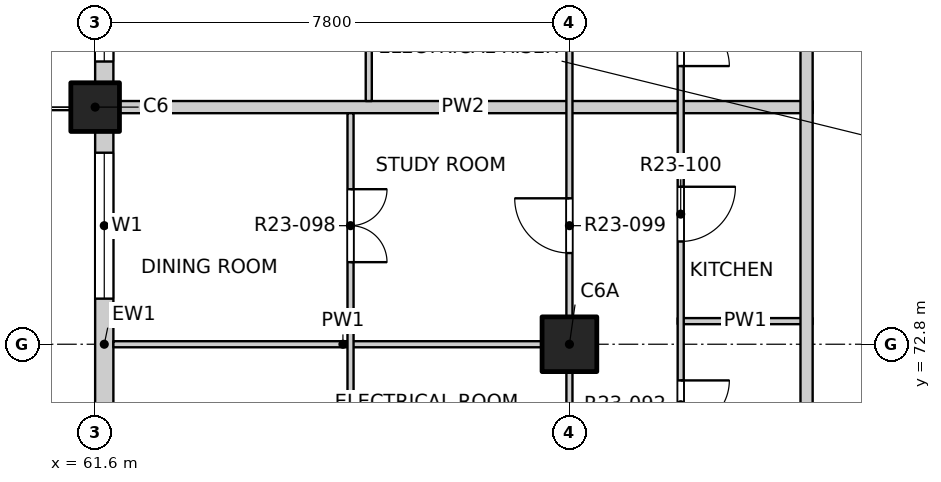
"""IFC4 building model, lengths in metres.
Left out: names, types, materials, properties, quantities, classifications, styles, units other than length and angle.
Written with IfcOpenShell. Run it as: python <this file> out.ifc"""

import sys

from ifc_helpers import new_model, si_unit, direction, frame, frame_2d, origin, origin_2d, place, context, subcontext, project, spatial, rectangle, extrude, element, fill, save


model = new_model("IFC4")
c1 = context("Model", 3, precision=1e-05, world=origin(), true_north=direction((0.0, 1.0)))
c2 = subcontext(c1, "Body", "Model", "MODEL_VIEW")
j1 = project(units=[si_unit("LENGTHUNIT", "METRE"), si_unit("PLANEANGLEUNIT", "RADIAN")], contexts=[c1])
p1 = place(None, origin())
s1 = spatial("IfcSite", under=j1, at=p1, CompositionType="ELEMENT")
p2 = place(p1, origin())
s2 = spatial("IfcBuilding", under=s1, at=p2, CompositionType="ELEMENT")
p3 = place(p2, frame((0.0, 0.0, 238.1)))
s3 = spatial("IfcBuildingStorey", under=s2, at=p3, CompositionType="ELEMENT", Elevation=238.1)
p4 = place(p3, frame((61.6, 76.7, -0.25), z_axis=(0.0, 0.0, 1.0), x_axis=(1.0, 0.0, 0.0)))
e1 = element("IfcColumn", 1, at=p4, inside=s3, PredefinedType="COLUMN", context=c2, shape_type="SweptSolid", body=[
    extrude(rectangle(XDim=0.8, YDim=0.8, at=origin_2d()), origin(), (0.0, 0.0, 1.0), 3.35),
])
p5 = place(p3, frame((69.4, 72.8, -0.25), z_axis=(0.0, 0.0, 1.0), x_axis=(1.0, 0.0, 0.0)))
e2 = element("IfcColumn", 2, at=p5, inside=s3, PredefinedType="COLUMN", context=c2, shape_type="SweptSolid", body=[
    extrude(rectangle(XDim=0.9, YDim=0.9, at=origin_2d()), origin(), (0.0, 0.0, 1.0), 3.35),
])
p6 = place(p3, frame((61.75, 69.3, 0.0), z_axis=(0.0, 0.0, 1.0), x_axis=(0.0, 1.0, 0.0)))
e3 = element("IfcWall", 3, at=p6, inside=s3, PredefinedType="SOLIDWALL", context=c2, shape_type="SweptSolid", body=[
    extrude(rectangle(XDim=7.0, YDim=0.3, at=frame_2d((3.5, 0.0))), origin(), (0.0, 0.0, 1.0), 3.1),
])
p7 = place(p6, frame((0.65, 0.0, 0.0)))
e4 = element("IfcOpeningElement", 4, at=p7, cuts=e3, PredefinedType="OPENING", context=c2, shape_type="SweptSolid", body=[
    extrude(rectangle(XDim=1.8, YDim=2.4, at=frame_2d((0.9, 1.2))), frame((0.0, 0.16, 0.0), z_axis=(0.0, -1.0, 0.0), x_axis=(1.0, 0.0, 0.0)), (0.0, 0.0, 1.0), 0.32),
])
p8 = place(p6, frame((4.25, 0.0, 0.9)))
e5 = element("IfcOpeningElement", 5, at=p8, cuts=e3, PredefinedType="OPENING", context=c2, shape_type="SweptSolid", body=[
    extrude(rectangle(XDim=2.4, YDim=1.8, at=frame_2d((1.2, 0.9))), frame((0.0, 0.16, 0.0), z_axis=(0.0, -1.0, 0.0), x_axis=(1.0, 0.0, 0.0)), (0.0, 0.0, 1.0), 0.32),
])
p9 = place(p3, frame((61.75, 77.1, 0.0), z_axis=(0.0, 0.0, 1.0), x_axis=(0.0, 1.0, 0.0)))
e6 = element("IfcWall", 6, at=p9, inside=s3, PredefinedType="SOLIDWALL", context=c2, shape_type="SweptSolid", body=[
    extrude(rectangle(XDim=7.4, YDim=0.3, at=frame_2d((3.7, 0.0))), origin(), (0.0, 0.0, 1.0), 3.1),
])
p10 = place(p9, frame((0.35, 0.0, 0.9)))
e7 = element("IfcOpeningElement", 7, at=p10, cuts=e6, PredefinedType="OPENING", context=c2, shape_type="SweptSolid", body=[
    extrude(rectangle(XDim=2.4, YDim=1.8, at=frame_2d((1.2, 0.9))), frame((0.0, 0.16, 0.0), z_axis=(0.0, -1.0, 0.0), x_axis=(1.0, 0.0, 0.0)), (0.0, 0.0, 1.0), 0.32),
])
p11 = place(p9, frame((4.25, 0.0, 0.9)))
e8 = element("IfcOpeningElement", 8, at=p11, cuts=e6, PredefinedType="OPENING", context=c2, shape_type="SweptSolid", body=[
    extrude(rectangle(XDim=2.4, YDim=1.8, at=frame_2d((1.2, 0.9))), frame((0.0, 0.16, 0.0), z_axis=(0.0, -1.0, 0.0), x_axis=(1.0, 0.0, 0.0)), (0.0, 0.0, 1.0), 0.32),
])
p12 = place(p3, frame((61.9, 72.8, 0.0), z_axis=(0.0, 0.0, 1.0), x_axis=(1.0, 0.0, 0.0)))
e9 = element("IfcWall", 9, at=p12, inside=s3, PredefinedType="PARTITIONING", context=c2, shape_type="SweptSolid", body=[
    extrude(rectangle(XDim=7.55, YDim=0.1, at=frame_2d((3.775, 0.0))), origin(), (0.0, 0.0, 1.0), 3.1),
])
p13 = place(p3, frame((71.18, 73.18, 0.0), z_axis=(0.0, 0.0, 1.0), x_axis=(1.0, 0.0, 0.0)))
e10 = element("IfcWall", 10, at=p13, inside=s3, PredefinedType="PARTITIONING", context=c2, shape_type="SweptSolid", body=[
    extrude(rectangle(XDim=2.22, YDim=0.1, at=frame_2d((1.11, 0.0))), origin(), (0.0, 0.0, 1.0), 3.1),
])
p14 = place(p3, frame((61.9, 76.7, 0.0), z_axis=(0.0, 0.0, 1.0), x_axis=(1.0, 0.0, 0.0)))
e11 = element("IfcWall", 11, at=p14, inside=s3, PredefinedType="PARTITIONING", context=c2, shape_type="SweptSolid", body=[
    extrude(rectangle(XDim=11.5, YDim=0.2, at=frame_2d((5.75, 0.0))), origin(), (0.0, 0.0, 1.0), 3.1),
])
p15 = place(p3, frame((65.8, 61.2, 0.0), z_axis=(0.0, 0.0, 1.0), x_axis=(0.0, 1.0, 0.0)))
e12 = element("IfcWall", 12, at=p15, inside=s3, PredefinedType="PARTITIONING", context=c2, shape_type="SweptSolid", body=[
    extrude(rectangle(XDim=15.4, YDim=0.1, at=frame_2d((7.7, 0.0))), origin(), (0.0, 0.0, 1.0), 3.1),
])
p16 = place(p15, frame((0.425, 0.0, 0.0)))
e13 = element("IfcOpeningElement", 13, at=p16, cuts=e12, PredefinedType="OPENING", context=c2, shape_type="SweptSolid", body=[
    extrude(rectangle(XDim=0.9, YDim=2.1, at=frame_2d((0.45, 1.05))), frame((0.0, 0.06, 0.0), z_axis=(0.0, -1.0, 0.0), x_axis=(1.0, 0.0, 0.0)), (0.0, 0.0, 1.0), 0.12),
])
p17 = place(p15, frame((2.375, 0.0, 0.0)))
e14 = element("IfcOpeningElement", 14, at=p17, cuts=e12, PredefinedType="OPENING", context=c2, shape_type="SweptSolid", body=[
    extrude(rectangle(XDim=0.9, YDim=2.1, at=frame_2d((0.45, 1.05))), frame((0.0, 0.06, 0.0), z_axis=(0.0, -1.0, 0.0), x_axis=(1.0, 0.0, 0.0)), (0.0, 0.0, 1.0), 0.12),
])
p18 = place(p15, frame((4.325, 0.0, 0.0)))
e15 = element("IfcOpeningElement", 15, at=p18, cuts=e12, PredefinedType="OPENING", context=c2, shape_type="SweptSolid", body=[
    extrude(rectangle(XDim=0.9, YDim=2.1, at=frame_2d((0.45, 1.05))), frame((0.0, 0.06, 0.0), z_axis=(0.0, -1.0, 0.0), x_axis=(1.0, 0.0, 0.0)), (0.0, 0.0, 1.0), 0.12),
])
p19 = place(p15, frame((6.275, 0.0, 0.0)))
e16 = element("IfcOpeningElement", 16, at=p19, cuts=e12, PredefinedType="OPENING", context=c2, shape_type="SweptSolid", body=[
    extrude(rectangle(XDim=0.9, YDim=2.1, at=frame_2d((0.45, 1.05))), frame((0.0, 0.06, 0.0), z_axis=(0.0, -1.0, 0.0), x_axis=(1.0, 0.0, 0.0)), (0.0, 0.0, 1.0), 0.12),
])
p20 = place(p15, frame((9.05, 0.0, 0.0)))
e17 = element("IfcOpeningElement", 17, at=p20, cuts=e12, PredefinedType="OPENING", context=c2, shape_type="SweptSolid", body=[
    extrude(rectangle(XDim=1.2, YDim=2.1, at=frame_2d((0.6, 1.05))), frame((0.0, 0.06, 0.0), z_axis=(0.0, -1.0, 0.0), x_axis=(1.0, 0.0, 0.0)), (0.0, 0.0, 1.0), 0.12),
])
p21 = place(p15, frame((12.95, 0.0, 0.0)))
e18 = element("IfcOpeningElement", 18, at=p21, cuts=e12, PredefinedType="OPENING", context=c2, shape_type="SweptSolid", body=[
    extrude(rectangle(XDim=1.2, YDim=2.1, at=frame_2d((0.6, 1.05))), frame((0.0, 0.06, 0.0), z_axis=(0.0, -1.0, 0.0), x_axis=(1.0, 0.0, 0.0)), (0.0, 0.0, 1.0), 0.12),
])
p22 = place(p3, frame((66.1, 76.8, 0.0), z_axis=(0.0, 0.0, 1.0), x_axis=(0.0, 1.0, 0.0)))
e19 = element("IfcWall", 19, at=p22, inside=s3, PredefinedType="PARTITIONING", context=c2, shape_type="SweptSolid", body=[
    extrude(rectangle(XDim=11.3, YDim=0.1, at=frame_2d((5.65, 0.0))), origin(), (0.0, 0.0, 1.0), 3.1),
])
p23 = place(p22, frame((1.25, 0.0, 0.0)))
e20 = element("IfcOpeningElement", 20, at=p23, cuts=e19, PredefinedType="OPENING", context=c2, shape_type="SweptSolid", body=[
    extrude(rectangle(XDim=1.2, YDim=2.1, at=frame_2d((0.6, 1.05))), frame((0.0, 0.06, 0.0), z_axis=(0.0, -1.0, 0.0), x_axis=(1.0, 0.0, 0.0)), (0.0, 0.0, 1.0), 0.12),
])
p24 = place(p22, frame((5.15, 0.0, 0.0)))
e21 = element("IfcOpeningElement", 21, at=p24, cuts=e19, PredefinedType="OPENING", context=c2, shape_type="SweptSolid", body=[
    extrude(rectangle(XDim=1.2, YDim=2.1, at=frame_2d((0.6, 1.05))), frame((0.0, 0.06, 0.0), z_axis=(0.0, -1.0, 0.0), x_axis=(1.0, 0.0, 0.0)), (0.0, 0.0, 1.0), 0.12),
])
p25 = place(p22, frame((9.05, 0.0, 0.0)))
e22 = element("IfcOpeningElement", 22, at=p25, cuts=e19, PredefinedType="OPENING", context=c2, shape_type="SweptSolid", body=[
    extrude(rectangle(XDim=1.2, YDim=2.1, at=frame_2d((0.6, 1.05))), frame((0.0, 0.06, 0.0), z_axis=(0.0, -1.0, 0.0), x_axis=(1.0, 0.0, 0.0)), (0.0, 0.0, 1.0), 0.12),
])
p26 = place(p3, frame((69.4, 41.9, 0.0), z_axis=(0.0, 0.0, 1.0), x_axis=(0.0, 1.0, 0.0)))
e23 = element("IfcWall", 23, at=p26, inside=s3, PredefinedType="PARTITIONING", context=c2, shape_type="SweptSolid", body=[
    extrude(rectangle(XDim=46.2, YDim=0.1, at=frame_2d((23.1, 0.0))), origin(), (0.0, 0.0, 1.0), 3.1),
])
p27 = place(p26, frame((1.2, 0.0, 0.0)))
e24 = element("IfcOpeningElement", 24, at=p27, cuts=e23, PredefinedType="OPENING", context=c2, shape_type="SweptSolid", body=[
    extrude(rectangle(XDim=0.9, YDim=2.1, at=frame_2d((0.45, 1.05))), frame((0.0, 0.06, 0.0), z_axis=(0.0, -1.0, 0.0), x_axis=(1.0, 0.0, 0.0)), (0.0, 0.0, 1.0), 0.12),
])
p28 = place(p26, frame((6.025, 0.0, 0.0)))
e25 = element("IfcOpeningElement", 25, at=p28, cuts=e23, PredefinedType="OPENING", context=c2, shape_type="SweptSolid", body=[
    extrude(rectangle(XDim=0.9, YDim=2.1, at=frame_2d((0.45, 1.05))), frame((0.0, 0.06, 0.0), z_axis=(0.0, -1.0, 0.0), x_axis=(1.0, 0.0, 0.0)), (0.0, 0.0, 1.0), 0.12),
])
p29 = place(p26, frame((9.975, 0.0, 0.0)))
e26 = element("IfcOpeningElement", 26, at=p29, cuts=e23, PredefinedType="OPENING", context=c2, shape_type="SweptSolid", body=[
    extrude(rectangle(XDim=0.9, YDim=2.1, at=frame_2d((0.45, 1.05))), frame((0.0, 0.06, 0.0), z_axis=(0.0, -1.0, 0.0), x_axis=(1.0, 0.0, 0.0)), (0.0, 0.0, 1.0), 0.12),
])
p30 = place(p26, frame((12.9, 0.0, 0.0)))
e27 = element("IfcOpeningElement", 27, at=p30, cuts=e23, PredefinedType="OPENING", context=c2, shape_type="SweptSolid", body=[
    extrude(rectangle(XDim=0.9, YDim=2.1, at=frame_2d((0.45, 1.05))), frame((0.0, 0.06, 0.0), z_axis=(0.0, -1.0, 0.0), x_axis=(1.0, 0.0, 0.0)), (0.0, 0.0, 1.0), 0.12),
])
p31 = place(p26, frame((17.775, 0.0, 0.0)))
e28 = element("IfcOpeningElement", 28, at=p31, cuts=e23, PredefinedType="OPENING", context=c2, shape_type="SweptSolid", body=[
    extrude(rectangle(XDim=0.9, YDim=2.1, at=frame_2d((0.45, 1.05))), frame((0.0, 0.06, 0.0), z_axis=(0.0, -1.0, 0.0), x_axis=(1.0, 0.0, 0.0)), (0.0, 0.0, 1.0), 0.12),
])
p32 = place(p26, frame((21.625, 0.0, 0.0)))
e29 = element("IfcOpeningElement", 29, at=p32, cuts=e23, PredefinedType="OPENING", context=c2, shape_type="SweptSolid", body=[
    extrude(rectangle(XDim=0.9, YDim=2.1, at=frame_2d((0.45, 1.05))), frame((0.0, 0.06, 0.0), z_axis=(0.0, -1.0, 0.0), x_axis=(1.0, 0.0, 0.0)), (0.0, 0.0, 1.0), 0.12),
])
p33 = place(p26, frame((25.575, 0.0, 0.0)))
e30 = element("IfcOpeningElement", 30, at=p33, cuts=e23, PredefinedType="OPENING", context=c2, shape_type="SweptSolid", body=[
    extrude(rectangle(XDim=0.9, YDim=2.1, at=frame_2d((0.45, 1.05))), frame((0.0, 0.06, 0.0), z_axis=(0.0, -1.0, 0.0), x_axis=(1.0, 0.0, 0.0)), (0.0, 0.0, 1.0), 0.12),
])
p34 = place(p26, frame((28.5, 0.0, 0.0)))
e31 = element("IfcOpeningElement", 31, at=p34, cuts=e23, PredefinedType="OPENING", context=c2, shape_type="SweptSolid", body=[
    extrude(rectangle(XDim=0.9, YDim=2.1, at=frame_2d((0.45, 1.05))), frame((0.0, 0.06, 0.0), z_axis=(0.0, -1.0, 0.0), x_axis=(1.0, 0.0, 0.0)), (0.0, 0.0, 1.0), 0.12),
])
p35 = place(p26, frame((32.4, 0.0, 0.0)))
e32 = element("IfcOpeningElement", 32, at=p35, cuts=e23, PredefinedType="OPENING", context=c2, shape_type="SweptSolid", body=[
    extrude(rectangle(XDim=0.9, YDim=2.1, at=frame_2d((0.45, 1.05))), frame((0.0, 0.06, 0.0), z_axis=(0.0, -1.0, 0.0), x_axis=(1.0, 0.0, 0.0)), (0.0, 0.0, 1.0), 0.12),
])
p36 = place(p26, frame((36.3, 0.0, 0.0)))
e33 = element("IfcOpeningElement", 33, at=p36, cuts=e23, PredefinedType="OPENING", context=c2, shape_type="SweptSolid", body=[
    extrude(rectangle(XDim=0.9, YDim=2.1, at=frame_2d((0.45, 1.05))), frame((0.0, 0.06, 0.0), z_axis=(0.0, -1.0, 0.0), x_axis=(1.0, 0.0, 0.0)), (0.0, 0.0, 1.0), 0.12),
])
p37 = place(p26, frame((40.2, 0.0, 0.0)))
e34 = element("IfcOpeningElement", 34, at=p37, cuts=e23, PredefinedType="OPENING", context=c2, shape_type="SweptSolid", body=[
    extrude(rectangle(XDim=0.9, YDim=2.1, at=frame_2d((0.45, 1.05))), frame((0.0, 0.06, 0.0), z_axis=(0.0, -1.0, 0.0), x_axis=(1.0, 0.0, 0.0)), (0.0, 0.0, 1.0), 0.12),
])
p38 = place(p26, frame((44.1, 0.0, 0.0)))
e35 = element("IfcOpeningElement", 35, at=p38, cuts=e23, PredefinedType="OPENING", context=c2, shape_type="SweptSolid", body=[
    extrude(rectangle(XDim=0.9, YDim=2.1, at=frame_2d((0.45, 1.05))), frame((0.0, 0.06, 0.0), z_axis=(0.0, -1.0, 0.0), x_axis=(1.0, 0.0, 0.0)), (0.0, 0.0, 1.0), 0.12),
])
p39 = place(p3, frame((71.23, 63.95, 0.0), z_axis=(0.0, 0.0, 1.0), x_axis=(0.0, 1.0, 0.0)))
e36 = element("IfcWall", 36, at=p39, inside=s3, PredefinedType="PARTITIONING", context=c2, shape_type="SweptSolid", body=[
    extrude(rectangle(XDim=17.85, YDim=0.1, at=frame_2d((8.925, 0.0))), origin(), (0.0, 0.0, 1.0), 3.1),
])
p40 = place(p39, frame((0.7, 0.0, 0.0)))
e37 = element("IfcOpeningElement", 37, at=p40, cuts=e36, PredefinedType="OPENING", context=c2, shape_type="SweptSolid", body=[
    extrude(rectangle(XDim=0.9, YDim=2.1, at=frame_2d((0.45, 1.05))), frame((0.0, 0.06, 0.0), z_axis=(0.0, -1.0, 0.0), x_axis=(1.0, 0.0, 0.0)), (0.0, 0.0, 1.0), 0.12),
])
p41 = place(p39, frame((3.1, 0.0, 0.0)))
e38 = element("IfcOpeningElement", 38, at=p41, cuts=e36, PredefinedType="OPENING", context=c2, shape_type="SweptSolid", body=[
    extrude(rectangle(XDim=0.8, YDim=2.1, at=frame_2d((0.4, 1.05))), frame((0.0, 0.06, 0.0), z_axis=(0.0, -1.0, 0.0), x_axis=(1.0, 0.0, 0.0)), (0.0, 0.0, 1.0), 0.12),
])
p42 = place(p39, frame((5.115, 0.0, 0.0)))
e39 = element("IfcOpeningElement", 39, at=p42, cuts=e36, PredefinedType="OPENING", context=c2, shape_type="SweptSolid", body=[
    extrude(rectangle(XDim=0.9, YDim=2.1, at=frame_2d((0.45, 1.05))), frame((0.0, 0.06, 0.0), z_axis=(0.0, -1.0, 0.0), x_axis=(1.0, 0.0, 0.0)), (0.0, 0.0, 1.0), 0.12),
])
p43 = place(p39, frame((7.455, 0.0, 0.0)))
e40 = element("IfcOpeningElement", 40, at=p43, cuts=e36, PredefinedType="OPENING", context=c2, shape_type="SweptSolid", body=[
    extrude(rectangle(XDim=0.8, YDim=2.1, at=frame_2d((0.4, 1.05))), frame((0.0, 0.06, 0.0), z_axis=(0.0, -1.0, 0.0), x_axis=(1.0, 0.0, 0.0)), (0.0, 0.0, 1.0), 0.12),
])
p44 = place(p39, frame((10.54, 0.0, 0.0)))
e41 = element("IfcOpeningElement", 41, at=p44, cuts=e36, PredefinedType="OPENING", context=c2, shape_type="SweptSolid", body=[
    extrude(rectangle(XDim=0.9, YDim=2.1, at=frame_2d((0.45, 1.05))), frame((0.0, 0.06, 0.0), z_axis=(0.0, -1.0, 0.0), x_axis=(1.0, 0.0, 0.0)), (0.0, 0.0, 1.0), 0.12),
])
p45 = place(p39, frame((13.425, 0.0, 0.0)))
e42 = element("IfcOpeningElement", 42, at=p45, cuts=e36, PredefinedType="OPENING", context=c2, shape_type="SweptSolid", body=[
    extrude(rectangle(XDim=0.8, YDim=2.1, at=frame_2d((0.4, 1.05))), frame((0.0, 0.06, 0.0), z_axis=(0.0, -1.0, 0.0), x_axis=(1.0, 0.0, 0.0)), (0.0, 0.0, 1.0), 0.12),
])
p46 = place(p39, frame((15.95, 0.0, 0.0)))
e43 = element("IfcOpeningElement", 43, at=p46, cuts=e36, PredefinedType="OPENING", context=c2, shape_type="SweptSolid", body=[
    extrude(rectangle(XDim=0.9, YDim=2.1, at=frame_2d((0.45, 1.05))), frame((0.0, 0.06, 0.0), z_axis=(0.0, -1.0, 0.0), x_axis=(1.0, 0.0, 0.0)), (0.0, 0.0, 1.0), 0.12),
])
p47 = place(p3, frame((73.3, 49.5, 0.0), z_axis=(0.0, 0.0, 1.0), x_axis=(0.0, 1.0, 0.0)))
e44 = element("IfcWall", 44, at=p47, inside=s3, PredefinedType="PARTITIONING", context=c2, shape_type="SweptSolid", body=[
    extrude(rectangle(XDim=34.9, YDim=0.2, at=frame_2d((17.45, 0.0))), origin(), (0.0, 0.0, 1.0), 3.1),
])
p48 = place(p47, frame((3.075, 0.0, 0.0)))
e45 = element("IfcOpeningElement", 45, at=p48, cuts=e44, PredefinedType="OPENING", context=c2, shape_type="SweptSolid", body=[
    extrude(rectangle(XDim=1.0, YDim=2.1, at=frame_2d((0.5, 1.05))), frame((0.0, 0.11, 0.0), z_axis=(0.0, -1.0, 0.0), x_axis=(1.0, 0.0, 0.0)), (0.0, 0.0, 1.0), 0.22),
])
p49 = place(p47, frame((14.575, 0.0, 0.0)))
e46 = element("IfcOpeningElement", 46, at=p49, cuts=e44, PredefinedType="OPENING", context=c2, shape_type="SweptSolid", body=[
    extrude(rectangle(XDim=1.0, YDim=2.1, at=frame_2d((0.5, 1.05))), frame((0.0, 0.11, 0.0), z_axis=(0.0, -1.0, 0.0), x_axis=(1.0, 0.0, 0.0)), (0.0, 0.0, 1.0), 0.22),
])
p50 = place(p47, frame((33.625, 0.0, 0.0)))
e47 = element("IfcOpeningElement", 47, at=p50, cuts=e44, PredefinedType="OPENING", context=c2, shape_type="SweptSolid", body=[
    extrude(rectangle(XDim=1.0, YDim=2.1, at=frame_2d((0.5, 1.05))), frame((0.0, 0.11, 0.0), z_axis=(0.0, -1.0, 0.0), x_axis=(1.0, 0.0, 0.0)), (0.0, 0.0, 1.0), 0.22),
])
p51 = place(p8, origin())
e48 = element("IfcWindow", 48, at=p51, inside=s3, PartitioningType="DOUBLE_PANEL_VERTICAL", PredefinedType="WINDOW", context=c2, shape_type="SweptSolid", body=[
    extrude(rectangle(XDim=2.4, YDim=1.8, at=frame_2d((1.2, 0.9))), frame((0.0, 0.03, 0.0), z_axis=(0.0, -1.0, 0.0), x_axis=(1.0, 0.0, 0.0)), (0.0, 0.0, 1.0), 0.06),
])
fill(e5, e48)
p52 = place(p10, origin())
e49 = element("IfcWindow", 49, at=p52, inside=s3, PartitioningType="DOUBLE_PANEL_VERTICAL", PredefinedType="WINDOW", context=c2, shape_type="SweptSolid", body=[
    extrude(rectangle(XDim=2.4, YDim=1.8, at=frame_2d((1.2, 0.9))), frame((0.0, 0.03, 0.0), z_axis=(0.0, -1.0, 0.0), x_axis=(1.0, 0.0, 0.0)), (0.0, 0.0, 1.0), 0.06),
])
fill(e7, e49)
p53 = place(p43, origin())
e50 = element("IfcDoor", 50, at=p53, inside=s3, OperationType="SINGLE_SWING_LEFT", PredefinedType="DOOR", context=c2, shape_type="SweptSolid", body=[
    extrude(rectangle(XDim=0.8, YDim=2.1, at=frame_2d((0.4, 1.05))), frame((0.0, 0.025, 0.0), z_axis=(0.0, -1.0, 0.0), x_axis=(1.0, 0.0, 0.0)), (0.0, 0.0, 1.0), 0.05),
])
fill(e40, e50)
p54 = place(p21, origin())
e51 = element("IfcDoor", 51, at=p54, inside=s3, OperationType="DOUBLE_DOOR_SINGLE_SWING", PredefinedType="DOOR", context=c2, shape_type="SweptSolid", body=[
    extrude(rectangle(XDim=1.2, YDim=2.1, at=frame_2d((0.6, 1.05))), frame((0.0, 0.025, 0.0), z_axis=(0.0, -1.0, 0.0), x_axis=(1.0, 0.0, 0.0)), (0.0, 0.0, 1.0), 0.05),
])
fill(e18, e51)
p55 = place(p35, origin())
e52 = element("IfcDoor", 52, at=p55, inside=s3, OperationType="SINGLE_SWING_RIGHT", PredefinedType="DOOR", context=c2, shape_type="SweptSolid", body=[
    extrude(rectangle(XDim=0.9, YDim=2.1, at=frame_2d((0.45, 1.05))), frame((0.0, 0.025, 0.0), z_axis=(0.0, -1.0, 0.0), x_axis=(1.0, 0.0, 0.0)), (0.0, 0.0, 1.0), 0.05),
])
fill(e32, e52)
p56 = place(p44, origin())
e53 = element("IfcDoor", 53, at=p56, inside=s3, OperationType="SINGLE_SWING_LEFT", PredefinedType="DOOR", context=c2, shape_type="SweptSolid", body=[
    extrude(rectangle(XDim=0.9, YDim=2.1, at=frame_2d((0.45, 1.05))), frame((0.0, 0.025, 0.0), z_axis=(0.0, -1.0, 0.0), x_axis=(1.0, 0.0, 0.0)), (0.0, 0.0, 1.0), 0.05),
])
fill(e41, e53)
p57 = place(p45, origin())
e54 = element("IfcDoor", 54, at=p57, inside=s3, OperationType="SINGLE_SWING_RIGHT", PredefinedType="DOOR", context=c2, shape_type="SweptSolid", body=[
    extrude(rectangle(XDim=0.8, YDim=2.1, at=frame_2d((0.4, 1.05))), frame((0.0, 0.025, 0.0), z_axis=(0.0, -1.0, 0.0), x_axis=(1.0, 0.0, 0.0)), (0.0, 0.0, 1.0), 0.05),
])
fill(e42, e54)
save(model, sys.argv[1])
